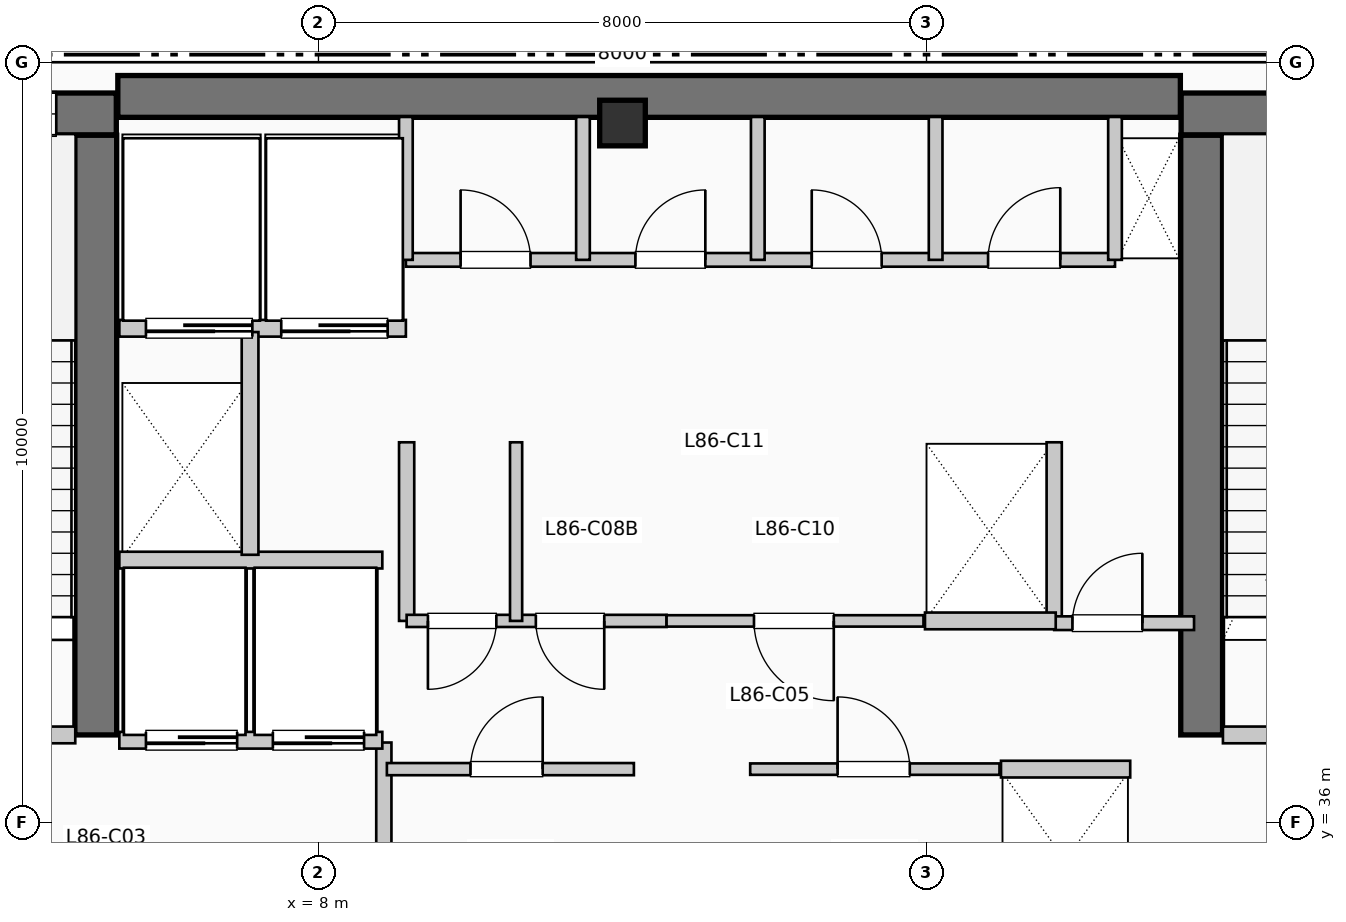
"""IFC4 building model, lengths in metres.
Left out: names, types, materials, properties, quantities, classifications, styles, units other than length and angle.
Written with IfcOpenShell. Run it as: python <this file> out.ifc"""

import sys

from ifc_helpers import new_model, si_unit, direction, frame, frame_2d, origin, origin_2d, place, context, subcontext, project, spatial, rectangle, extrude, element, fill, save


model = new_model("IFC4")
c1 = context("Model", 3, precision=1e-05, world=origin(), true_north=direction((0.0, 1.0)))
c2 = subcontext(c1, "Body", "Model", "MODEL_VIEW")
j1 = project(units=[si_unit("LENGTHUNIT", "METRE"), si_unit("PLANEANGLEUNIT", "RADIAN")], contexts=[c1])
p1 = place(None, origin())
s1 = spatial("IfcSite", under=j1, at=p1, CompositionType="ELEMENT")
p2 = place(p1, origin())
s2 = spatial("IfcBuilding", under=s1, at=p2, CompositionType="ELEMENT")
p3 = place(p2, frame((0.0, 0.0, 352.11)))
s3 = spatial("IfcBuildingStorey", under=s2, at=p3, CompositionType="ELEMENT", Elevation=352.11)
p4 = place(p3, frame((5.36, 45.55, 0.0), z_axis=(0.0, 0.0, 1.0), x_axis=(1.0, 0.0, 0.0)))
e1 = element("IfcWall", 1, at=p4, inside=s3, PredefinedType="SHEAR", context=c2, shape_type="SweptSolid", body=[
    extrude(rectangle(XDim=13.98, YDim=0.55, at=frame_2d((6.99, 0.0))), origin(), (0.0, 0.0, 1.0), 4.62),
])
p5 = place(p3, frame((5.07, 37.15, 0.0), z_axis=(0.0, 0.0, 1.0), x_axis=(0.0, 1.0, 0.0)))
e2 = element("IfcWall", 2, at=p5, inside=s3, PredefinedType="SHEAR", context=c2, shape_type="SweptSolid", body=[
    extrude(rectangle(XDim=7.89, YDim=0.55, at=frame_2d((3.945, 0.0))), origin(), (0.0, 0.0, 1.0), 4.62),
])
p6 = place(p3, frame((1.1, 45.32, 0.0), z_axis=(0.0, 0.0, 1.0), x_axis=(1.0, 0.0, 0.0)))
e3 = element("IfcWall", 3, at=p6, inside=s3, PredefinedType="SHEAR", context=c2, shape_type="SweptSolid", body=[
    extrude(rectangle(XDim=4.24, YDim=0.55, at=frame_2d((2.12, 0.0))), origin(), (0.0, 0.0, 1.0), 4.62),
])
p7 = place(p6, frame((2.05, 0.0, 1.05)))
e4 = element("IfcOpeningElement", 4, at=p7, cuts=e3, PredefinedType="OPENING", context=c2, shape_type="SweptSolid", body=[
    extrude(rectangle(XDim=1.4, YDim=1.8, at=frame_2d((0.7, 0.9))), frame((0.0, 0.285, 0.0), z_axis=(0.0, -1.0, 0.0), x_axis=(1.0, 0.0, 0.0)), (0.0, 0.0, 1.0), 0.57),
])
p8 = place(p3, frame((19.62, 37.15, 0.0), z_axis=(0.0, 0.0, 1.0), x_axis=(0.0, 1.0, 0.0)))
e5 = element("IfcWall", 5, at=p8, inside=s3, PredefinedType="SHEAR", context=c2, shape_type="SweptSolid", body=[
    extrude(rectangle(XDim=7.89, YDim=0.55, at=frame_2d((3.945, 0.0))), origin(), (0.0, 0.0, 1.0), 4.62),
])
p9 = place(p3, frame((19.35, 45.32, 0.0), z_axis=(0.0, 0.0, 1.0), x_axis=(1.0, 0.0, 0.0)))
e6 = element("IfcWall", 6, at=p9, inside=s3, PredefinedType="SHEAR", context=c2, shape_type="SweptSolid", body=[
    extrude(rectangle(XDim=3.69, YDim=0.55, at=frame_2d((1.845, 0.0))), origin(), (0.0, 0.0, 1.0), 4.62),
])
p10 = place(p9, frame((1.15, 0.0, 1.05)))
e7 = element("IfcOpeningElement", 7, at=p10, cuts=e6, PredefinedType="OPENING", context=c2, shape_type="SweptSolid", body=[
    extrude(rectangle(XDim=1.4, YDim=1.8, at=frame_2d((0.7, 0.9))), frame((0.0, 0.285, 0.0), z_axis=(0.0, -1.0, 0.0), x_axis=(1.0, 0.0, 0.0)), (0.0, 0.0, 1.0), 0.57),
])
p11 = place(p3, frame((12.0, 45.2, 0.0), z_axis=(0.0, 0.0, 1.0), x_axis=(1.0, 0.0, 0.0)))
e8 = element("IfcColumn", 8, at=p11, inside=s3, PredefinedType="COLUMN", context=c2, shape_type="SweptSolid", body=[
    extrude(rectangle(XDim=0.6, YDim=0.6, at=origin_2d()), origin(), (0.0, 0.0, 1.0), 4.62),
])
p12 = place(p3, frame((1.65, 37.15, 0.0), z_axis=(0.0, 0.0, 1.0), x_axis=(1.0, 0.0, 0.0)))
e9 = element("IfcWall", 9, at=p12, inside=s3, PredefinedType="PARTITIONING", context=c2, shape_type="SweptSolid", body=[
    extrude(rectangle(XDim=3.15, YDim=0.22, at=frame_2d((1.575, 0.0))), origin(), (0.0, 0.0, 1.0), 4.37),
])
p13 = place(p12, frame((2.05, 0.0, 0.0), z_axis=(0.0, 0.0, 1.0), x_axis=(-1.0, 0.0, 0.0)))
e10 = element("IfcOpeningElement", 10, at=p13, cuts=e9, PredefinedType="OPENING", context=c2, shape_type="SweptSolid", body=[
    extrude(rectangle(XDim=1.05, YDim=2.15, at=frame_2d((0.525, 1.075))), frame((0.0, 0.12, 0.0), z_axis=(0.0, -1.0, 0.0), x_axis=(1.0, 0.0, 0.0)), (0.0, 0.0, 1.0), 0.24),
])
p14 = place(p3, frame((8.86, 34.55, 0.0), z_axis=(0.0, 0.0, 1.0), x_axis=(0.0, 1.0, 0.0)))
e11 = element("IfcWall", 11, at=p14, inside=s3, PredefinedType="PARTITIONING", context=c2, shape_type="SweptSolid", body=[
    extrude(rectangle(XDim=2.5, YDim=0.2, at=frame_2d((1.25, 0.0))), origin(), (0.0, 0.0, 1.0), 4.37),
])
p15 = place(p3, frame((19.9, 37.15, 0.0), z_axis=(0.0, 0.0, 1.0), x_axis=(1.0, 0.0, 0.0)))
e12 = element("IfcWall", 12, at=p15, inside=s3, PredefinedType="PARTITIONING", context=c2, shape_type="SweptSolid", body=[
    extrude(rectangle(XDim=3.15, YDim=0.22, at=frame_2d((1.575, 0.0))), origin(), (0.0, 0.0, 1.0), 4.37),
])
p16 = place(p15, frame((2.05, 0.0, 0.0), z_axis=(0.0, 0.0, 1.0), x_axis=(-1.0, 0.0, 0.0)))
e13 = element("IfcOpeningElement", 13, at=p16, cuts=e12, PredefinedType="OPENING", context=c2, shape_type="SweptSolid", body=[
    extrude(rectangle(XDim=1.05, YDim=2.15, at=frame_2d((0.525, 1.075))), frame((0.0, 0.12, 0.0), z_axis=(0.0, -1.0, 0.0), x_axis=(1.0, 0.0, 0.0)), (0.0, 0.0, 1.0), 0.24),
])
p17 = place(p3, frame((5.38, 37.08, 0.0), z_axis=(0.0, 0.0, 1.0), x_axis=(1.0, 0.0, 0.0)))
e14 = element("IfcWall", 14, at=p17, inside=s3, PredefinedType="PARTITIONING", context=c2, shape_type="SweptSolid", body=[
    extrude(rectangle(XDim=3.46, YDim=0.22, at=frame_2d((1.73, 0.0))), origin(), (0.0, 0.0, 1.0), 4.37),
])
p18 = place(p17, frame((1.55, 0.0, 0.0), z_axis=(0.0, 0.0, 1.0), x_axis=(-1.0, 0.0, 0.0)))
e15 = element("IfcOpeningElement", 15, at=p18, cuts=e14, PredefinedType="OPENING", context=c2, shape_type="SweptSolid", body=[
    extrude(rectangle(XDim=1.2, YDim=2.2, at=frame_2d((0.6, 1.1))), frame((0.0, 0.12, 0.0), z_axis=(0.0, -1.0, 0.0), x_axis=(1.0, 0.0, 0.0)), (0.0, 0.0, 1.0), 0.24),
])
p19 = place(p17, frame((3.22, 0.0, 0.0), z_axis=(0.0, 0.0, 1.0), x_axis=(-1.0, 0.0, 0.0)))
e16 = element("IfcOpeningElement", 16, at=p19, cuts=e14, PredefinedType="OPENING", context=c2, shape_type="SweptSolid", body=[
    extrude(rectangle(XDim=1.2, YDim=2.2, at=frame_2d((0.6, 1.1))), frame((0.0, 0.12, 0.0), z_axis=(0.0, -1.0, 0.0), x_axis=(1.0, 0.0, 0.0)), (0.0, 0.0, 1.0), 0.24),
])
p20 = place(p3, frame((5.38, 39.45, 0.0), z_axis=(0.0, 0.0, 1.0), x_axis=(1.0, 0.0, 0.0)))
e17 = element("IfcWall", 17, at=p20, inside=s3, PredefinedType="PARTITIONING", context=c2, shape_type="SweptSolid", body=[
    extrude(rectangle(XDim=3.46, YDim=0.22, at=frame_2d((1.73, 0.0))), origin(), (0.0, 0.0, 1.0), 4.37),
])
p21 = place(p3, frame((5.38, 42.5, 0.0), z_axis=(0.0, 0.0, 1.0), x_axis=(1.0, 0.0, 0.0)))
e18 = element("IfcWall", 18, at=p21, inside=s3, PredefinedType="PARTITIONING", context=c2, shape_type="SweptSolid", body=[
    extrude(rectangle(XDim=3.77, YDim=0.22, at=frame_2d((1.885, 0.0))), origin(), (0.0, 0.0, 1.0), 4.37),
])
p22 = place(p21, frame((1.75, 0.0, 0.0), z_axis=(0.0, 0.0, 1.0), x_axis=(-1.0, 0.0, 0.0)))
e19 = element("IfcOpeningElement", 19, at=p22, cuts=e18, PredefinedType="OPENING", context=c2, shape_type="SweptSolid", body=[
    extrude(rectangle(XDim=1.4, YDim=2.2, at=frame_2d((0.7, 1.1))), frame((0.0, 0.12, 0.0), z_axis=(0.0, -1.0, 0.0), x_axis=(1.0, 0.0, 0.0)), (0.0, 0.0, 1.0), 0.24),
])
p23 = place(p21, frame((3.53, 0.0, 0.0), z_axis=(0.0, 0.0, 1.0), x_axis=(-1.0, 0.0, 0.0)))
e20 = element("IfcOpeningElement", 20, at=p23, cuts=e18, PredefinedType="OPENING", context=c2, shape_type="SweptSolid", body=[
    extrude(rectangle(XDim=1.4, YDim=2.2, at=frame_2d((0.7, 1.1))), frame((0.0, 0.12, 0.0), z_axis=(0.0, -1.0, 0.0), x_axis=(1.0, 0.0, 0.0)), (0.0, 0.0, 1.0), 0.24),
])
p24 = place(p3, frame((7.1, 39.52, 0.0), z_axis=(0.0, 0.0, 1.0), x_axis=(0.0, 1.0, 0.0)))
e21 = element("IfcWall", 21, at=p24, inside=s3, PredefinedType="PARTITIONING", context=c2, shape_type="SweptSolid", body=[
    extrude(rectangle(XDim=2.93, YDim=0.22, at=frame_2d((1.465, 0.0))), origin(), (0.0, 0.0, 1.0), 4.37),
])
for number, where, z_axis, x_axis in (
    (22, (9.16, 38.65, 0.0), (0.0, 0.0, 1.0), (0.0, 1.0, 0.0)),
    (23, (17.68, 38.65, 0.0), (0.0, 0.0, 1.0), (0.0, 1.0, 0.0)),
):
    element("IfcWall", number, at=place(p3, frame(where, z_axis=z_axis, x_axis=x_axis)), inside=s3, PredefinedType="PARTITIONING", context=c2, shape_type="SweptSolid", body=[
        extrude(rectangle(XDim=2.35, YDim=0.2, at=frame_2d((1.175, 0.0))), origin(), (0.0, 0.0, 1.0), 4.37),
    ])
p25 = place(p3, frame((17.68, 38.62, 0.0), z_axis=(0.0, 0.0, 1.0), x_axis=(1.0, 0.0, 0.0)))
e24 = element("IfcWall", 24, at=p25, inside=s3, PredefinedType="PARTITIONING", context=c2, shape_type="SweptSolid", body=[
    extrude(rectangle(XDim=1.84, YDim=0.18, at=frame_2d((0.92, 0.0))), origin(), (0.0, 0.0, 1.0), 4.37),
])
p26 = place(p25, frame((0.24, 0.0, 0.0)))
e25 = element("IfcOpeningElement", 25, at=p26, cuts=e24, PredefinedType="OPENING", context=c2, shape_type="SweptSolid", body=[
    extrude(rectangle(XDim=0.92, YDim=2.1, at=frame_2d((0.46, 1.05))), frame((0.0, 0.1, 0.0), z_axis=(0.0, -1.0, 0.0), x_axis=(1.0, 0.0, 0.0)), (0.0, 0.0, 1.0), 0.2),
])
p27 = place(p3, frame((8.9, 36.7, 0.0), z_axis=(0.0, 0.0, 1.0), x_axis=(1.0, 0.0, 0.0)))
e26 = element("IfcWall", 26, at=p27, inside=s3, PredefinedType="PARTITIONING", context=c2, shape_type="SweptSolid", body=[
    extrude(rectangle(XDim=3.25, YDim=0.16, at=frame_2d((1.625, 0.0))), origin(), (0.0, 0.0, 1.0), 4.37),
])
p28 = place(p27, frame((1.1, 0.0, 0.0)))
e27 = element("IfcOpeningElement", 27, at=p28, cuts=e26, PredefinedType="OPENING", context=c2, shape_type="SweptSolid", body=[
    extrude(rectangle(XDim=0.95, YDim=2.15, at=frame_2d((0.475, 1.075))), frame((0.0, 0.09, 0.0), z_axis=(0.0, -1.0, 0.0), x_axis=(1.0, 0.0, 0.0)), (0.0, 0.0, 1.0), 0.18),
])
p29 = place(p3, frame((9.16, 38.65, 0.0), z_axis=(0.0, 0.0, 1.0), x_axis=(1.0, 0.0, 0.0)))
e28 = element("IfcWall", 28, at=p29, inside=s3, PredefinedType="PARTITIONING", context=c2, shape_type="SweptSolid", body=[
    extrude(rectangle(XDim=3.42, YDim=0.16, at=frame_2d((1.71, 0.0))), origin(), (0.0, 0.0, 1.0), 4.37),
])
p30 = place(p29, frame((1.18, 0.0, 0.0), z_axis=(0.0, 0.0, 1.0), x_axis=(-1.0, 0.0, 0.0)))
e29 = element("IfcOpeningElement", 29, at=p30, cuts=e28, PredefinedType="OPENING", context=c2, shape_type="SweptSolid", body=[
    extrude(rectangle(XDim=0.9, YDim=2.15, at=frame_2d((0.45, 1.075))), frame((0.0, 0.09, 0.0), z_axis=(0.0, -1.0, 0.0), x_axis=(1.0, 0.0, 0.0)), (0.0, 0.0, 1.0), 0.18),
])
p31 = place(p29, frame((2.6, 0.0, 0.0), z_axis=(0.0, 0.0, 1.0), x_axis=(-1.0, 0.0, 0.0)))
e30 = element("IfcOpeningElement", 30, at=p31, cuts=e28, PredefinedType="OPENING", context=c2, shape_type="SweptSolid", body=[
    extrude(rectangle(XDim=0.9, YDim=2.15, at=frame_2d((0.45, 1.075))), frame((0.0, 0.09, 0.0), z_axis=(0.0, -1.0, 0.0), x_axis=(1.0, 0.0, 0.0)), (0.0, 0.0, 1.0), 0.18),
])
p32 = place(p3, frame((10.6, 38.65, 0.0), z_axis=(0.0, 0.0, 1.0), x_axis=(0.0, 1.0, 0.0)))
e31 = element("IfcWall", 31, at=p32, inside=s3, PredefinedType="PARTITIONING", context=c2, shape_type="SweptSolid", body=[
    extrude(rectangle(XDim=2.35, YDim=0.16, at=frame_2d((1.175, 0.0))), origin(), (0.0, 0.0, 1.0), 4.37),
])
p33 = place(p3, frame((13.68, 36.7, 0.0), z_axis=(0.0, 0.0, 1.0), x_axis=(1.0, 0.0, 0.0)))
e32 = element("IfcWall", 32, at=p33, inside=s3, PredefinedType="PARTITIONING", context=c2, shape_type="SweptSolid", body=[
    extrude(rectangle(XDim=3.28, YDim=0.15, at=frame_2d((1.64, 0.0))), origin(), (0.0, 0.0, 1.0), 4.37),
])
p34 = place(p33, frame((1.15, 0.0, 0.0)))
e33 = element("IfcOpeningElement", 33, at=p34, cuts=e32, PredefinedType="OPENING", context=c2, shape_type="SweptSolid", body=[
    extrude(rectangle(XDim=0.95, YDim=2.15, at=frame_2d((0.475, 1.075))), frame((0.0, 0.085, 0.0), z_axis=(0.0, -1.0, 0.0), x_axis=(1.0, 0.0, 0.0)), (0.0, 0.0, 1.0), 0.17),
])
p35 = place(p3, frame((12.58, 38.65, 0.0), z_axis=(0.0, 0.0, 1.0), x_axis=(1.0, 0.0, 0.0)))
e34 = element("IfcWall", 34, at=p35, inside=s3, PredefinedType="PARTITIONING", context=c2, shape_type="SweptSolid", body=[
    extrude(rectangle(XDim=3.38, YDim=0.15, at=frame_2d((1.69, 0.0))), origin(), (0.0, 0.0, 1.0), 4.37),
])
p36 = place(p35, frame((2.2, 0.0, 0.0), z_axis=(0.0, 0.0, 1.0), x_axis=(-1.0, 0.0, 0.0)))
e35 = element("IfcOpeningElement", 35, at=p36, cuts=e34, PredefinedType="OPENING", context=c2, shape_type="SweptSolid", body=[
    extrude(rectangle(XDim=1.05, YDim=2.15, at=frame_2d((0.525, 1.075))), frame((0.0, 0.085, 0.0), z_axis=(0.0, -1.0, 0.0), x_axis=(1.0, 0.0, 0.0)), (0.0, 0.0, 1.0), 0.17),
])
p37 = place(p3, frame((16.98, 36.7, 0.0), z_axis=(0.0, 0.0, 1.0), x_axis=(1.0, 0.0, 0.0)))
e36 = element("IfcWall", 36, at=p37, inside=s3, PredefinedType="PARTITIONING", context=c2, shape_type="SweptSolid", body=[
    extrude(rectangle(XDim=1.7, YDim=0.22, at=frame_2d((0.85, 0.0))), origin(), (0.0, 0.0, 1.0), 4.37),
])
p38 = place(p3, frame((15.98, 38.65, 0.0), z_axis=(0.0, 0.0, 1.0), x_axis=(1.0, 0.0, 0.0)))
e37 = element("IfcWall", 37, at=p38, inside=s3, PredefinedType="PARTITIONING", context=c2, shape_type="SweptSolid", body=[
    extrude(rectangle(XDim=1.72, YDim=0.22, at=frame_2d((0.86, 0.0))), origin(), (0.0, 0.0, 1.0), 4.37),
])
p39 = place(p3, frame((9.15, 43.4, 0.0), z_axis=(0.0, 0.0, 1.0), x_axis=(1.0, 0.0, 0.0)))
e38 = element("IfcWall", 38, at=p39, inside=s3, PredefinedType="PLUMBINGWALL", context=c2, shape_type="SweptSolid", body=[
    extrude(rectangle(XDim=9.33, YDim=0.18, at=frame_2d((4.665, 0.0))), origin(), (0.0, 0.0, 1.0), 4.37),
])
p40 = place(p39, frame((0.72, 0.0, 0.0)))
e39 = element("IfcOpeningElement", 39, at=p40, cuts=e38, PredefinedType="OPENING", context=c2, shape_type="SweptSolid", body=[
    extrude(rectangle(XDim=0.92, YDim=2.1, at=frame_2d((0.46, 1.05))), frame((0.0, 0.1, 0.0), z_axis=(0.0, -1.0, 0.0), x_axis=(1.0, 0.0, 0.0)), (0.0, 0.0, 1.0), 0.2),
])
p41 = place(p39, frame((3.02, 0.0, 0.0)))
e40 = element("IfcOpeningElement", 40, at=p41, cuts=e38, PredefinedType="OPENING", context=c2, shape_type="SweptSolid", body=[
    extrude(rectangle(XDim=0.92, YDim=2.1, at=frame_2d((0.46, 1.05))), frame((0.0, 0.1, 0.0), z_axis=(0.0, -1.0, 0.0), x_axis=(1.0, 0.0, 0.0)), (0.0, 0.0, 1.0), 0.2),
])
p42 = place(p39, frame((5.34, 0.0, 0.0)))
e41 = element("IfcOpeningElement", 41, at=p42, cuts=e38, PredefinedType="OPENING", context=c2, shape_type="SweptSolid", body=[
    extrude(rectangle(XDim=0.92, YDim=2.1, at=frame_2d((0.46, 1.05))), frame((0.0, 0.1, 0.0), z_axis=(0.0, -1.0, 0.0), x_axis=(1.0, 0.0, 0.0)), (0.0, 0.0, 1.0), 0.2),
])
p43 = place(p39, frame((7.66, 0.0, 0.0)))
e42 = element("IfcOpeningElement", 42, at=p43, cuts=e38, PredefinedType="OPENING", context=c2, shape_type="SweptSolid", body=[
    extrude(rectangle(XDim=0.95, YDim=2.1, at=frame_2d((0.475, 1.05))), frame((0.0, 0.1, 0.0), z_axis=(0.0, -1.0, 0.0), x_axis=(1.0, 0.0, 0.0)), (0.0, 0.0, 1.0), 0.2),
])
for number, where, z_axis, x_axis in (
    (43, (9.15, 43.4, 0.0), (0.0, 0.0, 1.0), (0.0, 1.0, 0.0)),
    (44, (18.48, 43.4, 0.0), (0.0, 0.0, 1.0), (0.0, 1.0, 0.0)),
    (45, (11.48, 43.4, 0.0), (0.0, 0.0, 1.0), (0.0, 1.0, 0.0)),
    (46, (13.78, 43.4, 0.0), (0.0, 0.0, 1.0), (0.0, 1.0, 0.0)),
    (47, (16.12, 43.4, 0.0), (0.0, 0.0, 1.0), (0.0, 1.0, 0.0)),
):
    element("IfcWall", number, at=place(p3, frame(where, z_axis=z_axis, x_axis=x_axis)), inside=s3, PredefinedType="PLUMBINGWALL", context=c2, shape_type="SweptSolid", body=[
        extrude(rectangle(XDim=1.88, YDim=0.18, at=frame_2d((0.94, 0.0))), origin(), (0.0, 0.0, 1.0), 4.37),
    ])
p44 = place(p7, origin())
e48 = element("IfcWindow", 48, at=p44, inside=s3, PartitioningType="SINGLE_PANEL", PredefinedType="WINDOW", context=c2, shape_type="SweptSolid", body=[
    extrude(rectangle(XDim=1.4, YDim=1.8, at=frame_2d((0.7, 0.9))), frame((0.0, 0.03, 0.0), z_axis=(0.0, -1.0, 0.0), x_axis=(1.0, 0.0, 0.0)), (0.0, 0.0, 1.0), 0.06),
])
fill(e4, e48)
p45 = place(p18, origin())
e49 = element("IfcDoor", 49, at=p45, inside=s3, OperationType="SLIDING_TO_RIGHT", PredefinedType="DOOR", context=c2, shape_type="SweptSolid", body=[
    extrude(rectangle(XDim=1.2, YDim=2.2, at=frame_2d((0.6, 1.1))), frame((0.0, 0.025, 0.0), z_axis=(0.0, -1.0, 0.0), x_axis=(1.0, 0.0, 0.0)), (0.0, 0.0, 1.0), 0.05),
])
fill(e15, e49)
p46 = place(p19, origin())
e50 = element("IfcDoor", 50, at=p46, inside=s3, OperationType="SLIDING_TO_RIGHT", PredefinedType="DOOR", context=c2, shape_type="SweptSolid", body=[
    extrude(rectangle(XDim=1.2, YDim=2.2, at=frame_2d((0.6, 1.1))), frame((0.0, 0.025, 0.0), z_axis=(0.0, -1.0, 0.0), x_axis=(1.0, 0.0, 0.0)), (0.0, 0.0, 1.0), 0.05),
])
fill(e16, e50)
p47 = place(p22, origin())
e51 = element("IfcDoor", 51, at=p47, inside=s3, OperationType="SLIDING_TO_LEFT", PredefinedType="DOOR", context=c2, shape_type="SweptSolid", body=[
    extrude(rectangle(XDim=1.4, YDim=2.2, at=frame_2d((0.7, 1.1))), frame((0.0, 0.025, 0.0), z_axis=(0.0, -1.0, 0.0), x_axis=(1.0, 0.0, 0.0)), (0.0, 0.0, 1.0), 0.05),
])
fill(e19, e51)
p48 = place(p23, origin())
e52 = element("IfcDoor", 52, at=p48, inside=s3, OperationType="SLIDING_TO_LEFT", PredefinedType="DOOR", context=c2, shape_type="SweptSolid", body=[
    extrude(rectangle(XDim=1.4, YDim=2.2, at=frame_2d((0.7, 1.1))), frame((0.0, 0.025, 0.0), z_axis=(0.0, -1.0, 0.0), x_axis=(1.0, 0.0, 0.0)), (0.0, 0.0, 1.0), 0.05),
])
fill(e20, e52)
p49 = place(p26, origin())
e53 = element("IfcDoor", 53, at=p49, inside=s3, OperationType="SINGLE_SWING_RIGHT", PredefinedType="DOOR", context=c2, shape_type="SweptSolid", body=[
    extrude(rectangle(XDim=0.92, YDim=2.1, at=frame_2d((0.46, 1.05))), frame((0.0, 0.025, 0.0), z_axis=(0.0, -1.0, 0.0), x_axis=(1.0, 0.0, 0.0)), (0.0, 0.0, 1.0), 0.05),
])
fill(e25, e53)
p50 = place(p28, origin())
e54 = element("IfcDoor", 54, at=p50, inside=s3, OperationType="SINGLE_SWING_RIGHT", PredefinedType="DOOR", context=c2, shape_type="SweptSolid", body=[
    extrude(rectangle(XDim=0.95, YDim=2.15, at=frame_2d((0.475, 1.075))), frame((0.0, 0.025, 0.0), z_axis=(0.0, -1.0, 0.0), x_axis=(1.0, 0.0, 0.0)), (0.0, 0.0, 1.0), 0.05),
])
fill(e27, e54)
p51 = place(p30, origin())
e55 = element("IfcDoor", 55, at=p51, inside=s3, OperationType="SINGLE_SWING_LEFT", PredefinedType="DOOR", context=c2, shape_type="SweptSolid", body=[
    extrude(rectangle(XDim=0.9, YDim=2.15, at=frame_2d((0.45, 1.075))), frame((0.0, 0.025, 0.0), z_axis=(0.0, -1.0, 0.0), x_axis=(1.0, 0.0, 0.0)), (0.0, 0.0, 1.0), 0.05),
])
fill(e29, e55)
p52 = place(p31, origin())
e56 = element("IfcDoor", 56, at=p52, inside=s3, OperationType="SINGLE_SWING_RIGHT", PredefinedType="DOOR", context=c2, shape_type="SweptSolid", body=[
    extrude(rectangle(XDim=0.9, YDim=2.15, at=frame_2d((0.45, 1.075))), frame((0.0, 0.025, 0.0), z_axis=(0.0, -1.0, 0.0), x_axis=(1.0, 0.0, 0.0)), (0.0, 0.0, 1.0), 0.05),
])
fill(e30, e56)
p53 = place(p34, origin())
e57 = element("IfcDoor", 57, at=p53, inside=s3, OperationType="SINGLE_SWING_LEFT", PredefinedType="DOOR", context=c2, shape_type="SweptSolid", body=[
    extrude(rectangle(XDim=0.95, YDim=2.15, at=frame_2d((0.475, 1.075))), frame((0.0, 0.025, 0.0), z_axis=(0.0, -1.0, 0.0), x_axis=(1.0, 0.0, 0.0)), (0.0, 0.0, 1.0), 0.05),
])
fill(e33, e57)
p54 = place(p36, origin())
e58 = element("IfcDoor", 58, at=p54, inside=s3, OperationType="SINGLE_SWING_RIGHT", PredefinedType="DOOR", context=c2, shape_type="SweptSolid", body=[
    extrude(rectangle(XDim=1.05, YDim=2.15, at=frame_2d((0.525, 1.075))), frame((0.0, 0.025, 0.0), z_axis=(0.0, -1.0, 0.0), x_axis=(1.0, 0.0, 0.0)), (0.0, 0.0, 1.0), 0.05),
])
fill(e35, e58)
p55 = place(p40, origin())
e59 = element("IfcDoor", 59, at=p55, inside=s3, OperationType="SINGLE_SWING_LEFT", PredefinedType="DOOR", context=c2, shape_type="SweptSolid", body=[
    extrude(rectangle(XDim=0.92, YDim=2.1, at=frame_2d((0.46, 1.05))), frame((0.0, 0.025, 0.0), z_axis=(0.0, -1.0, 0.0), x_axis=(1.0, 0.0, 0.0)), (0.0, 0.0, 1.0), 0.05),
])
fill(e39, e59)
p56 = place(p41, origin())
e60 = element("IfcDoor", 60, at=p56, inside=s3, OperationType="SINGLE_SWING_RIGHT", PredefinedType="DOOR", context=c2, shape_type="SweptSolid", body=[
    extrude(rectangle(XDim=0.92, YDim=2.1, at=frame_2d((0.46, 1.05))), frame((0.0, 0.025, 0.0), z_axis=(0.0, -1.0, 0.0), x_axis=(1.0, 0.0, 0.0)), (0.0, 0.0, 1.0), 0.05),
])
fill(e40, e60)
p57 = place(p42, origin())
e61 = element("IfcDoor", 61, at=p57, inside=s3, OperationType="SINGLE_SWING_LEFT", PredefinedType="DOOR", context=c2, shape_type="SweptSolid", body=[
    extrude(rectangle(XDim=0.92, YDim=2.1, at=frame_2d((0.46, 1.05))), frame((0.0, 0.025, 0.0), z_axis=(0.0, -1.0, 0.0), x_axis=(1.0, 0.0, 0.0)), (0.0, 0.0, 1.0), 0.05),
])
fill(e41, e61)
p58 = place(p43, origin())
e62 = element("IfcDoor", 62, at=p58, inside=s3, OperationType="SINGLE_SWING_RIGHT", PredefinedType="DOOR", context=c2, shape_type="SweptSolid", body=[
    extrude(rectangle(XDim=0.95, YDim=2.1, at=frame_2d((0.475, 1.05))), frame((0.0, 0.025, 0.0), z_axis=(0.0, -1.0, 0.0), x_axis=(1.0, 0.0, 0.0)), (0.0, 0.0, 1.0), 0.05),
])
fill(e42, e62)
save(model, sys.argv[1])
